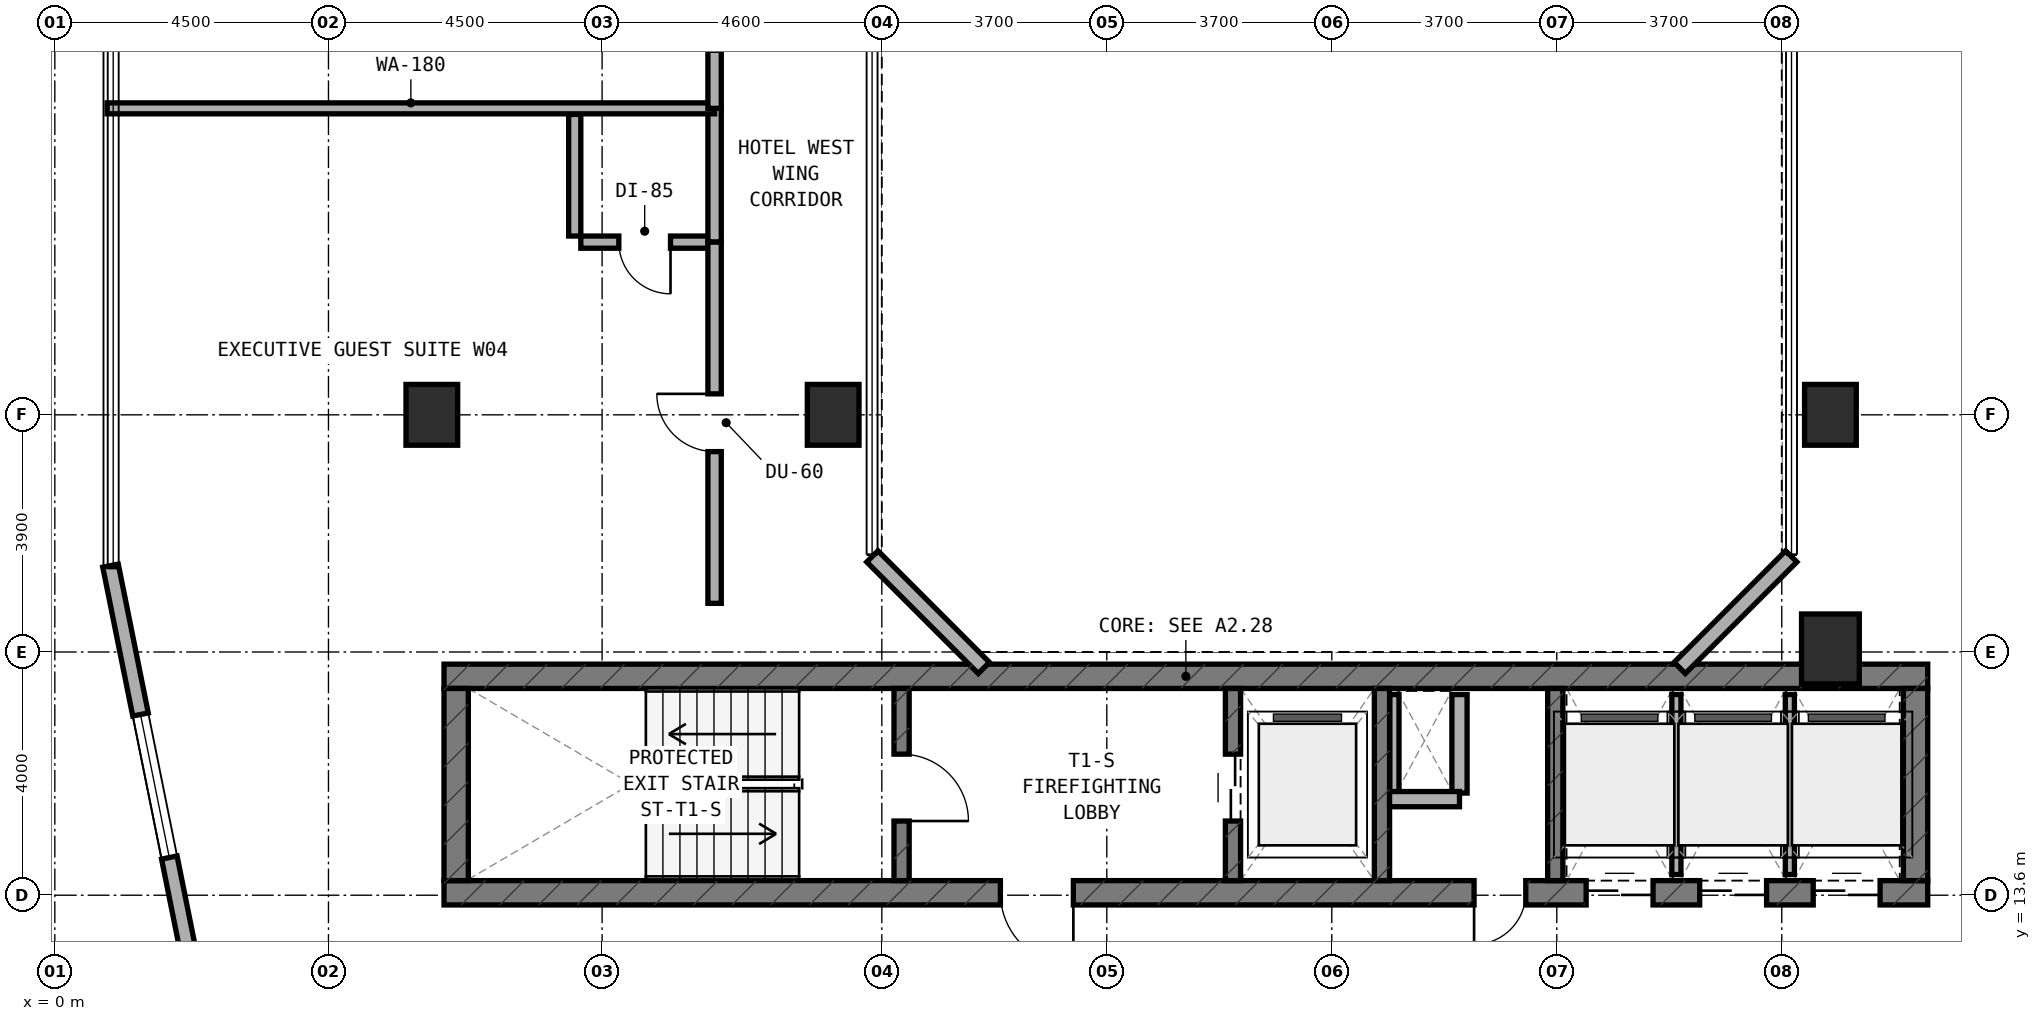
"""IFC4 building model, lengths in metres.
Left out: names, types, materials, properties, quantities, classifications, styles, units other than length and angle.
Written with IfcOpenShell. Run it as: python <this file> out.ifc"""

import sys

from ifc_helpers import new_model, si_unit, direction, frame, frame_2d, origin, origin_2d, place, context, subcontext, project, spatial, rectangle, extrude, element, fill, save


model = new_model("IFC4")
c1 = context("Model", 3, precision=1e-05, world=origin(), true_north=direction((0.0, 1.0)))
c2 = subcontext(c1, "Body", "Model", "MODEL_VIEW")
j1 = project(units=[si_unit("LENGTHUNIT", "METRE"), si_unit("PLANEANGLEUNIT", "RADIAN")], contexts=[c1])
p1 = place(None, origin())
s1 = spatial("IfcSite", under=j1, at=p1, CompositionType="ELEMENT")
p2 = place(p1, origin())
s2 = spatial("IfcBuilding", under=s1, at=p2, CompositionType="ELEMENT")
p3 = place(p2, frame((0.0, 0.0, 124.0)))
s3 = spatial("IfcBuildingStorey", under=s2, at=p3, CompositionType="ELEMENT", Elevation=124.0)
p4 = place(p3, frame((6.4, 13.64, 0.0), z_axis=(0.0, 0.0, 1.0), x_axis=(1.0, 0.0, 0.0)))
e1 = element("IfcWall", 1, at=p4, inside=s3, PredefinedType="SHEAR", context=c2, shape_type="SweptSolid", body=[
    extrude(rectangle(XDim=24.4, YDim=0.4, at=frame_2d((12.2, 0.0))), origin(), (0.0, 0.0, 1.0), 3.5),
])
p5 = place(p4, frame((9.15, 0.0, 0.0)))
e2 = element("IfcOpeningElement", 2, at=p5, cuts=e1, PredefinedType="OPENING", context=c2, shape_type="SweptSolid", body=[
    extrude(rectangle(XDim=1.2, YDim=2.15, at=frame_2d((0.6, 1.075))), frame((0.0, 0.21, 0.0), z_axis=(0.0, -1.0, 0.0), x_axis=(1.0, 0.0, 0.0)), (0.0, 0.0, 1.0), 0.42),
])
p6 = place(p4, frame((16.94, 0.0, 0.0)))
e3 = element("IfcOpeningElement", 3, at=p6, cuts=e1, PredefinedType="OPENING", context=c2, shape_type="SweptSolid", body=[
    extrude(rectangle(XDim=0.85, YDim=2.1, at=frame_2d((0.425, 1.05))), frame((0.0, 0.21, 0.0), z_axis=(0.0, -1.0, 0.0), x_axis=(1.0, 0.0, 0.0)), (0.0, 0.0, 1.0), 0.42),
])
p7 = place(p4, frame((18.783, 0.0, 0.0)))
e4 = element("IfcOpeningElement", 4, at=p7, cuts=e1, PredefinedType="OPENING", context=c2, shape_type="SweptSolid", body=[
    extrude(rectangle(XDim=1.1, YDim=2.15, at=frame_2d((0.55, 1.075))), frame((0.0, 0.21, 0.0), z_axis=(0.0, -1.0, 0.0), x_axis=(1.0, 0.0, 0.0)), (0.0, 0.0, 1.0), 0.42),
])
p8 = place(p4, frame((20.65, 0.0, 0.0)))
e5 = element("IfcOpeningElement", 5, at=p8, cuts=e1, PredefinedType="OPENING", context=c2, shape_type="SweptSolid", body=[
    extrude(rectangle(XDim=1.1, YDim=2.15, at=frame_2d((0.55, 1.075))), frame((0.0, 0.21, 0.0), z_axis=(0.0, -1.0, 0.0), x_axis=(1.0, 0.0, 0.0)), (0.0, 0.0, 1.0), 0.42),
])
p9 = place(p4, frame((22.517, 0.0, 0.0)))
e6 = element("IfcOpeningElement", 6, at=p9, cuts=e1, PredefinedType="OPENING", context=c2, shape_type="SweptSolid", body=[
    extrude(rectangle(XDim=1.1, YDim=2.15, at=frame_2d((0.55, 1.075))), frame((0.0, 0.21, 0.0), z_axis=(0.0, -1.0, 0.0), x_axis=(1.0, 0.0, 0.0)), (0.0, 0.0, 1.0), 0.42),
])
p10 = place(p3, frame((6.4, 17.2, 0.0), z_axis=(0.0, 0.0, 1.0), x_axis=(1.0, 0.0, 0.0)))
e7 = element("IfcWall", 7, at=p10, inside=s3, PredefinedType="SHEAR", context=c2, shape_type="SweptSolid", body=[
    extrude(rectangle(XDim=24.4, YDim=0.4, at=frame_2d((12.2, 0.0))), origin(), (0.0, 0.0, 1.0), 3.5),
])
for number, where, z_axis, x_axis in (
    (8, (6.6, 13.84, 0.0), (0.0, 0.0, 1.0), (0.0, 1.0, 0.0)),
    (9, (30.6, 13.84, 0.0), (0.0, 0.0, 1.0), (0.0, 1.0, 0.0)),
):
    element("IfcWall", number, at=place(p3, frame(where, z_axis=z_axis, x_axis=x_axis)), inside=s3, PredefinedType="SHEAR", context=c2, shape_type="SweptSolid", body=[
        extrude(rectangle(XDim=3.16, YDim=0.4, at=frame_2d((1.58, 0.0))), origin(), (0.0, 0.0, 1.0), 3.5),
    ])
p11 = place(p3, frame((13.925, 13.84, 0.0), z_axis=(0.0, 0.0, 1.0), x_axis=(0.0, 1.0, 0.0)))
e10 = element("IfcWall", 10, at=p11, inside=s3, PredefinedType="STANDARD", context=c2, shape_type="SweptSolid", body=[
    extrude(rectangle(XDim=3.16, YDim=0.25, at=frame_2d((1.58, 0.0))), origin(), (0.0, 0.0, 1.0), 3.22),
])
p12 = place(p11, frame((0.98, 0.0, 0.0)))
e11 = element("IfcOpeningElement", 11, at=p12, cuts=e10, PredefinedType="OPENING", context=c2, shape_type="SweptSolid", body=[
    extrude(rectangle(XDim=1.1, YDim=2.15, at=frame_2d((0.55, 1.075))), frame((0.0, 0.135, 0.0), z_axis=(0.0, -1.0, 0.0), x_axis=(1.0, 0.0, 0.0)), (0.0, 0.0, 1.0), 0.27),
])
p13 = place(p3, frame((19.375, 13.84, 0.0), z_axis=(0.0, 0.0, 1.0), x_axis=(0.0, 1.0, 0.0)))
e12 = element("IfcWall", 12, at=p13, inside=s3, PredefinedType="STANDARD", context=c2, shape_type="SweptSolid", body=[
    extrude(rectangle(XDim=3.16, YDim=0.25, at=frame_2d((1.58, 0.0))), origin(), (0.0, 0.0, 1.0), 3.22),
])
p14 = place(p13, frame((0.98, 0.0, 0.0)))
e13 = element("IfcOpeningElement", 13, at=p14, cuts=e12, PredefinedType="OPENING", context=c2, shape_type="SweptSolid", body=[
    extrude(rectangle(XDim=1.1, YDim=2.15, at=frame_2d((0.55, 1.075))), frame((0.0, 0.135, 0.0), z_axis=(0.0, -1.0, 0.0), x_axis=(1.0, 0.0, 0.0)), (0.0, 0.0, 1.0), 0.27),
])
for number, where, z_axis, x_axis in (
    (14, (21.825, 13.84, 0.0), (0.0, 0.0, 1.0), (0.0, 1.0, 0.0)),
    (15, (24.675, 13.84, 0.0), (0.0, 0.0, 1.0), (0.0, 1.0, 0.0)),
):
    element("IfcWall", number, at=place(p3, frame(where, z_axis=z_axis, x_axis=x_axis)), inside=s3, PredefinedType="STANDARD", context=c2, shape_type="SweptSolid", body=[
        extrude(rectangle(XDim=3.16, YDim=0.25, at=frame_2d((1.58, 0.0))), origin(), (0.0, 0.0, 1.0), 3.22),
    ])
for number, where, z_axis, x_axis in (
    (16, (6.2, 21.5, 0.0), (0.0, 0.0, 1.0), (1.0, 0.0, 0.0)),
    (17, (12.8, 21.5, 0.0), (0.0, 0.0, 1.0), (1.0, 0.0, 0.0)),
):
    element("IfcColumn", number, at=place(p3, frame(where, z_axis=z_axis, x_axis=x_axis)), inside=s3, PredefinedType="COLUMN", context=c2, shape_type="SweptSolid", body=[
        extrude(rectangle(XDim=0.85, YDim=1.0, at=origin_2d()), origin(), (0.0, 0.0, 1.0), 3.5),
    ])
p15 = place(p3, frame((29.2, 17.65, 0.0), z_axis=(0.0, 0.0, 1.0), x_axis=(1.0, 0.0, 0.0)))
e18 = element("IfcColumn", 18, at=p15, inside=s3, PredefinedType="COLUMN", context=c2, shape_type="SweptSolid", body=[
    extrude(rectangle(XDim=0.95, YDim=1.15, at=origin_2d()), origin(), (0.0, 0.0, 1.0), 3.5),
])
p16 = place(p3, frame((29.2, 21.5, 0.0), z_axis=(0.0, 0.0, 1.0), x_axis=(1.0, 0.0, 0.0)))
e19 = element("IfcColumn", 19, at=p16, inside=s3, PredefinedType="COLUMN", context=c2, shape_type="SweptSolid", body=[
    extrude(rectangle(XDim=0.85, YDim=1.0, at=origin_2d()), origin(), (0.0, 0.0, 1.0), 3.5),
])
p17 = place(p3, frame((0.916, 19.02, 0.0), z_axis=(0.0, 0.0, 1.0), x_axis=(0.197435082048, -0.980315963543, 0.0)))
e20 = element("IfcWall", 20, at=p17, inside=s3, PredefinedType="STANDARD", context=c2, shape_type="SweptSolid", body=[
    extrude(rectangle(XDim=9.183, YDim=0.26, at=frame_2d((4.591, 0.0))), origin(), (0.0, 0.0, 1.0), 3.22),
])
p18 = place(p17, frame((2.497, 0.0, 0.8)))
e21 = element("IfcOpeningElement", 21, at=p18, cuts=e20, PredefinedType="OPENING", context=c2, shape_type="SweptSolid", body=[
    extrude(rectangle(XDim=2.4, YDim=1.6, at=frame_2d((1.2, 0.8))), frame((0.0, 0.14, 0.0), z_axis=(0.0, -1.0, 0.0), x_axis=(1.0, 0.0, 0.0)), (0.0, 0.0, 1.0), 0.28),
])
for number, where, z_axis, x_axis in (
    (22, (26.722, 17.338, 0.0), (0.0, 0.0, 1.0), (0.707, 0.707, 0.0)),
    (23, (13.444, 19.172, 0.0), (0.0, 0.0, 1.0), (0.707, -0.707, 0.0)),
):
    element("IfcWall", number, at=place(p3, frame(where, z_axis=z_axis, x_axis=x_axis)), inside=s3, PredefinedType="STANDARD", context=c2, shape_type="SweptSolid", body=[
        extrude(rectangle(XDim=2.594, YDim=0.26, at=frame_2d((1.297, 0.0))), origin(), (0.0, 0.0, 1.0), 3.22),
    ])
p19 = place(p3, frame((22.03, 15.28, 0.0), z_axis=(0.0, 0.0, 1.0), x_axis=(0.0, 1.0, 0.0)))
e24 = element("IfcWall", 24, at=p19, inside=s3, PredefinedType="PARTITIONING", context=c2, shape_type="SweptSolid", body=[
    extrude(rectangle(XDim=1.62, YDim=0.15, at=frame_2d((0.81, 0.0))), origin(), (0.0, 0.0, 1.0), 3.22),
])
p20 = place(p3, frame((23.1, 15.28, 0.0), z_axis=(0.0, 0.0, 1.0), x_axis=(0.0, 1.0, 0.0)))
e25 = element("IfcWall", 25, at=p20, inside=s3, PredefinedType="SOLIDWALL", context=c2, shape_type="SweptSolid", body=[
    extrude(rectangle(XDim=1.62, YDim=0.25, at=frame_2d((0.81, 0.0))), origin(), (0.0, 0.0, 1.0), 3.22),
])
p21 = place(p3, frame((21.95, 15.18, 0.0), z_axis=(0.0, 0.0, 1.0), x_axis=(1.0, 0.0, 0.0)))
e26 = element("IfcWall", 26, at=p21, inside=s3, PredefinedType="SOLIDWALL", context=c2, shape_type="SweptSolid", body=[
    extrude(rectangle(XDim=1.15, YDim=0.25, at=frame_2d((0.575, 0.0))), origin(), (0.0, 0.0, 1.0), 3.22),
])
p22 = place(p3, frame((26.667, 13.94, 0.0), z_axis=(0.0, 0.0, 1.0), x_axis=(0.0, 1.0, 0.0)))
e27 = element("IfcWall", 27, at=p22, inside=s3, PredefinedType="PARTITIONING", context=c2, shape_type="SweptSolid", body=[
    extrude(rectangle(XDim=2.96, YDim=0.15, at=frame_2d((1.48, 0.0))), origin(), (0.0, 0.0, 1.0), 3.22),
])
p23 = place(p3, frame((28.533, 13.94, 0.0), z_axis=(0.0, 0.0, 1.0), x_axis=(0.0, 1.0, 0.0)))
e28 = element("IfcWall", 28, at=p23, inside=s3, PredefinedType="PARTITIONING", context=c2, shape_type="SweptSolid", body=[
    extrude(rectangle(XDim=2.96, YDim=0.15, at=frame_2d((1.48, 0.0))), origin(), (0.0, 0.0, 1.0), 2.695),
])
p24 = place(p3, frame((8.65, 24.34, 0.0), z_axis=(0.0, 0.0, 1.0), x_axis=(1.0, 0.0, 0.0)))
e29 = element("IfcWall", 29, at=p24, inside=s3, PredefinedType="PLUMBINGWALL", context=c2, shape_type="SweptSolid", body=[
    extrude(rectangle(XDim=2.1, YDim=0.2, at=frame_2d((1.05, 0.0))), origin(), (0.0, 0.0, 1.0), 3.22),
])
p25 = place(p24, frame((0.625, 0.0, 0.0)))
e30 = element("IfcOpeningElement", 30, at=p25, cuts=e29, PredefinedType="OPENING", context=c2, shape_type="SweptSolid", body=[
    extrude(rectangle(XDim=0.85, YDim=2.1, at=frame_2d((0.425, 1.05))), frame((0.0, 0.11, 0.0), z_axis=(0.0, -1.0, 0.0), x_axis=(1.0, 0.0, 0.0)), (0.0, 0.0, 1.0), 0.22),
])
p26 = place(p3, frame((8.55, 24.44, 0.0), z_axis=(0.0, 0.0, 1.0), x_axis=(0.0, 1.0, 0.0)))
e31 = element("IfcWall", 31, at=p26, inside=s3, PredefinedType="PLUMBINGWALL", context=c2, shape_type="SweptSolid", body=[
    extrude(rectangle(XDim=2.0, YDim=0.2, at=frame_2d((1.0, 0.0))), origin(), (0.0, 0.0, 1.0), 3.22),
])
p27 = place(p3, frame((10.85, 24.34, 0.0), z_axis=(0.0, 0.0, 1.0), x_axis=(0.0, 1.0, 0.0)))
e32 = element("IfcWall", 32, at=p27, inside=s3, PredefinedType="SOLIDWALL", context=c2, shape_type="SweptSolid", body=[
    extrude(rectangle(XDim=2.2, YDim=0.22, at=frame_2d((1.1, 0.0))), origin(), (0.0, 0.0, 1.0), 3.22),
])
p28 = place(p3, frame((10.85, 18.4, 0.0), z_axis=(0.0, 0.0, 1.0), x_axis=(0.0, 1.0, 0.0)))
e33 = element("IfcWall", 33, at=p28, inside=s3, PredefinedType="SOLIDWALL", context=c2, shape_type="SweptSolid", body=[
    extrude(rectangle(XDim=5.94, YDim=0.22, at=frame_2d((2.97, 0.0))), origin(), (0.0, 0.0, 1.0), 2.695),
])
p29 = place(p28, frame((2.495, 0.0, 0.0)))
e34 = element("IfcOpeningElement", 34, at=p29, cuts=e33, PredefinedType="OPENING", context=c2, shape_type="SweptSolid", body=[
    extrude(rectangle(XDim=0.95, YDim=2.1, at=frame_2d((0.475, 1.05))), frame((0.0, 0.12, 0.0), z_axis=(0.0, -1.0, 0.0), x_axis=(1.0, 0.0, 0.0)), (0.0, 0.0, 1.0), 0.24),
])
p30 = place(p3, frame((0.86, 26.54, 0.0), z_axis=(0.0, 0.0, 1.0), x_axis=(1.0, 0.0, 0.0)))
e35 = element("IfcWall", 35, at=p30, inside=s3, PredefinedType="SOLIDWALL", context=c2, shape_type="SweptSolid", body=[
    extrude(rectangle(XDim=9.99, YDim=0.18, at=frame_2d((4.995, 0.0))), origin(), (0.0, 0.0, 1.0), 2.835),
])
p31 = place(p3, frame((10.85, 26.54, 0.0), z_axis=(0.0, 0.0, 1.0), x_axis=(0.0, 1.0, 0.0)))
e36 = element("IfcWall", 36, at=p31, inside=s3, PredefinedType="SOLIDWALL", context=c2, shape_type="SweptSolid", body=[
    extrude(rectangle(XDim=2.86, YDim=0.22, at=frame_2d((1.43, 0.0))), origin(), (0.0, 0.0, 1.0), 2.695),
])
p32 = place(p31, frame((0.955, 0.0, 0.0)))
e37 = element("IfcOpeningElement", 37, at=p32, cuts=e36, PredefinedType="OPENING", context=c2, shape_type="SweptSolid", body=[
    extrude(rectangle(XDim=0.95, YDim=2.1, at=frame_2d((0.475, 1.05))), frame((0.0, 0.12, 0.0), z_axis=(0.0, -1.0, 0.0), x_axis=(1.0, 0.0, 0.0)), (0.0, 0.0, 1.0), 0.24),
])
p33 = place(p18, origin())
e38 = element("IfcWindow", 38, at=p33, inside=s3, PartitioningType="SINGLE_PANEL", PredefinedType="WINDOW", context=c2, shape_type="SweptSolid", body=[
    extrude(rectangle(XDim=2.4, YDim=1.6, at=frame_2d((1.2, 0.8))), frame((0.0, 0.03, 0.0), z_axis=(0.0, -1.0, 0.0), x_axis=(1.0, 0.0, 0.0)), (0.0, 0.0, 1.0), 0.06),
])
fill(e21, e38)
p34 = place(p12, frame((1.1, 0.0, 0.0), z_axis=(0.0, 0.0, 1.0), x_axis=(-1.0, 0.0, 0.0)))
e39 = element("IfcDoor", 39, at=p34, inside=s3, OperationType="SINGLE_SWING_RIGHT", PredefinedType="DOOR", context=c2, shape_type="SweptSolid", body=[
    extrude(rectangle(XDim=1.1, YDim=2.15, at=frame_2d((0.55, 1.075))), frame((0.0, 0.025, 0.0), z_axis=(0.0, -1.0, 0.0), x_axis=(1.0, 0.0, 0.0)), (0.0, 0.0, 1.0), 0.05),
])
fill(e11, e39)
p35 = place(p5, frame((1.2, 0.0, 0.0), z_axis=(0.0, 0.0, 1.0), x_axis=(-1.0, 0.0, 0.0)))
e40 = element("IfcDoor", 40, at=p35, inside=s3, OperationType="SINGLE_SWING_LEFT", PredefinedType="DOOR", context=c2, shape_type="SweptSolid", body=[
    extrude(rectangle(XDim=1.2, YDim=2.15, at=frame_2d((0.6, 1.075))), frame((0.0, 0.025, 0.0), z_axis=(0.0, -1.0, 0.0), x_axis=(1.0, 0.0, 0.0)), (0.0, 0.0, 1.0), 0.05),
])
fill(e2, e40)
p36 = place(p14, origin())
e41 = element("IfcDoor", 41, at=p36, inside=s3, OperationType="DOUBLE_DOOR_SLIDING", PredefinedType="DOOR", context=c2, shape_type="SweptSolid", body=[
    extrude(rectangle(XDim=1.1, YDim=2.15, at=frame_2d((0.55, 1.075))), frame((0.0, 0.025, 0.0), z_axis=(0.0, -1.0, 0.0), x_axis=(1.0, 0.0, 0.0)), (0.0, 0.0, 1.0), 0.05),
])
fill(e13, e41)
p37 = place(p6, frame((0.85, 0.0, 0.0), z_axis=(0.0, 0.0, 1.0), x_axis=(-1.0, 0.0, 0.0)))
e42 = element("IfcDoor", 42, at=p37, inside=s3, OperationType="SINGLE_SWING_RIGHT", PredefinedType="DOOR", context=c2, shape_type="SweptSolid", body=[
    extrude(rectangle(XDim=0.85, YDim=2.1, at=frame_2d((0.425, 1.05))), frame((0.0, 0.025, 0.0), z_axis=(0.0, -1.0, 0.0), x_axis=(1.0, 0.0, 0.0)), (0.0, 0.0, 1.0), 0.05),
])
fill(e3, e42)
p38 = place(p7, frame((1.1, 0.0, 0.0), z_axis=(0.0, 0.0, 1.0), x_axis=(-1.0, 0.0, 0.0)))
e43 = element("IfcDoor", 43, at=p38, inside=s3, OperationType="DOUBLE_DOOR_SLIDING", PredefinedType="DOOR", context=c2, shape_type="SweptSolid", body=[
    extrude(rectangle(XDim=1.1, YDim=2.15, at=frame_2d((0.55, 1.075))), frame((0.0, 0.025, 0.0), z_axis=(0.0, -1.0, 0.0), x_axis=(1.0, 0.0, 0.0)), (0.0, 0.0, 1.0), 0.05),
])
fill(e4, e43)
p39 = place(p8, frame((1.1, 0.0, 0.0), z_axis=(0.0, 0.0, 1.0), x_axis=(-1.0, 0.0, 0.0)))
e44 = element("IfcDoor", 44, at=p39, inside=s3, OperationType="DOUBLE_DOOR_SLIDING", PredefinedType="DOOR", context=c2, shape_type="SweptSolid", body=[
    extrude(rectangle(XDim=1.1, YDim=2.15, at=frame_2d((0.55, 1.075))), frame((0.0, 0.025, 0.0), z_axis=(0.0, -1.0, 0.0), x_axis=(1.0, 0.0, 0.0)), (0.0, 0.0, 1.0), 0.05),
])
fill(e5, e44)
p40 = place(p9, frame((1.1, 0.0, 0.0), z_axis=(0.0, 0.0, 1.0), x_axis=(-1.0, 0.0, 0.0)))
e45 = element("IfcDoor", 45, at=p40, inside=s3, OperationType="DOUBLE_DOOR_SLIDING", PredefinedType="DOOR", context=c2, shape_type="SweptSolid", body=[
    extrude(rectangle(XDim=1.1, YDim=2.15, at=frame_2d((0.55, 1.075))), frame((0.0, 0.025, 0.0), z_axis=(0.0, -1.0, 0.0), x_axis=(1.0, 0.0, 0.0)), (0.0, 0.0, 1.0), 0.05),
])
fill(e6, e45)
p41 = place(p25, frame((0.85, 0.0, 0.0), z_axis=(0.0, 0.0, 1.0), x_axis=(-1.0, 0.0, 0.0)))
e46 = element("IfcDoor", 46, at=p41, inside=s3, OperationType="SINGLE_SWING_LEFT", PredefinedType="DOOR", context=c2, shape_type="SweptSolid", body=[
    extrude(rectangle(XDim=0.85, YDim=2.1, at=frame_2d((0.425, 1.05))), frame((0.0, 0.025, 0.0), z_axis=(0.0, -1.0, 0.0), x_axis=(1.0, 0.0, 0.0)), (0.0, 0.0, 1.0), 0.05),
])
fill(e30, e46)
p42 = place(p29, origin())
e47 = element("IfcDoor", 47, at=p42, inside=s3, OperationType="SINGLE_SWING_RIGHT", PredefinedType="DOOR", context=c2, shape_type="SweptSolid", body=[
    extrude(rectangle(XDim=0.95, YDim=2.1, at=frame_2d((0.475, 1.05))), frame((0.0, 0.025, 0.0), z_axis=(0.0, -1.0, 0.0), x_axis=(1.0, 0.0, 0.0)), (0.0, 0.0, 1.0), 0.05),
])
fill(e34, e47)
save(model, sys.argv[1])
